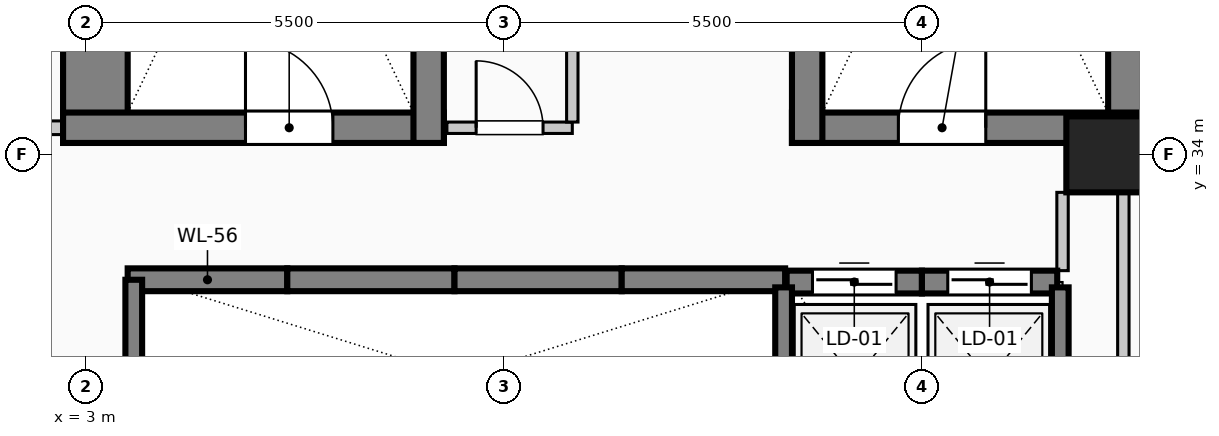
"""IFC4 building model, lengths in metres.
Left out: names, types, materials, properties, quantities, classifications, styles, units other than length and angle.
Written with IfcOpenShell. Run it as: python <this file> out.ifc"""

import sys

from ifc_helpers import new_model, si_unit, direction, frame, frame_2d, origin, origin_2d, place, context, subcontext, project, spatial, rectangle, circle, extrude, element, fill, save


model = new_model("IFC4")
c1 = context("Model", 3, precision=1e-05, world=origin(), true_north=direction((0.0, 1.0)))
c2 = subcontext(c1, "Body", "Model", "MODEL_VIEW")
j1 = project(units=[si_unit("LENGTHUNIT", "METRE"), si_unit("PLANEANGLEUNIT", "RADIAN")], contexts=[c1])
p1 = place(None, origin())
s1 = spatial("IfcSite", under=j1, at=p1, CompositionType="ELEMENT")
p2 = place(p1, origin())
s2 = spatial("IfcBuilding", under=s1, at=p2, CompositionType="ELEMENT")
p3 = place(p2, frame((0.0, 0.0, 108.6)))
s3 = spatial("IfcBuildingStorey", under=s2, at=p3, CompositionType="ELEMENT", Elevation=108.6)
for number, where, z_axis, x_axis in (
    (1, (3.125, 34.15, 0.0), (0.0, 0.0, 1.0), (0.0, 1.0, 0.0)),
    (2, (16.875, 34.15, 0.0), (0.0, 0.0, 1.0), (0.0, 1.0, 0.0)),
):
    element("IfcWall", number, at=place(p3, frame(where, z_axis=z_axis, x_axis=x_axis)), inside=s3, PredefinedType="SHEAR", context=c2, shape_type="SweptSolid", body=[
        extrude(rectangle(XDim=9.13, YDim=0.85, at=frame_2d((4.565, 0.0))), origin(), (0.0, 0.0, 1.0), 4.0),
    ])
p4 = place(p3, frame((2.7, 34.35, 0.0), z_axis=(0.0, 0.0, 1.0), x_axis=(1.0, 0.0, 0.0)))
e3 = element("IfcWall", 3, at=p4, inside=s3, PredefinedType="SHEAR", context=c2, shape_type="SweptSolid", body=[
    extrude(rectangle(XDim=5.01, YDim=0.4, at=frame_2d((2.505, 0.0))), origin(), (0.0, 0.0, 1.0), 4.0),
])
p5 = place(p4, frame((2.4, 0.0, 0.0)))
e4 = element("IfcOpeningElement", 4, at=p5, cuts=e3, PredefinedType="OPENING", context=c2, shape_type="SweptSolid", body=[
    extrude(rectangle(XDim=1.15, YDim=2.2, at=frame_2d((0.575, 1.1))), frame((0.0, 0.21, 0.0), z_axis=(0.0, -1.0, 0.0), x_axis=(1.0, 0.0, 0.0)), (0.0, 0.0, 1.0), 0.42),
])
p6 = place(p3, frame((12.29, 34.35, 0.0), z_axis=(0.0, 0.0, 1.0), x_axis=(1.0, 0.0, 0.0)))
e5 = element("IfcWall", 5, at=p6, inside=s3, PredefinedType="SHEAR", context=c2, shape_type="SweptSolid", body=[
    extrude(rectangle(XDim=5.01, YDim=0.4, at=frame_2d((2.505, 0.0))), origin(), (0.0, 0.0, 1.0), 4.0),
])
p7 = place(p6, frame((1.4, 0.0, 0.0)))
e6 = element("IfcOpeningElement", 6, at=p7, cuts=e5, PredefinedType="OPENING", context=c2, shape_type="SweptSolid", body=[
    extrude(rectangle(XDim=1.15, YDim=2.2, at=frame_2d((0.575, 1.1))), frame((0.0, 0.21, 0.0), z_axis=(0.0, -1.0, 0.0), x_axis=(1.0, 0.0, 0.0)), (0.0, 0.0, 1.0), 0.42),
])
for number, where, z_axis, x_axis in (
    (7, (7.51, 34.15, 0.0), (0.0, 0.0, 1.0), (0.0, 1.0, 0.0)),
    (8, (12.49, 34.15, 0.0), (0.0, 0.0, 1.0), (0.0, 1.0, 0.0)),
):
    element("IfcWall", number, at=place(p3, frame(where, z_axis=z_axis, x_axis=x_axis)), inside=s3, PredefinedType="SHEAR", context=c2, shape_type="SweptSolid", body=[
        extrude(rectangle(XDim=9.13, YDim=0.4, at=frame_2d((4.565, 0.0))), origin(), (0.0, 0.0, 1.0), 4.0),
    ])
p8 = place(p3, frame((16.4, 34.0, 0.0), z_axis=(0.0, 0.0, 1.0), x_axis=(1.0, 0.0, 0.0)))
e9 = element("IfcColumn", 9, at=p8, inside=s3, PredefinedType="COLUMN", context=c2, shape_type="SweptSolid", body=[
    extrude(circle(Radius=0.5, at=origin_2d()), origin(), (0.0, 0.0, 1.0), 4.0),
])
p9 = place(p3, frame((12.22, 32.32, 0.0), z_axis=(0.0, 0.0, 1.0), x_axis=(1.0, 0.0, 0.0)))
e10 = element("IfcWall", 10, at=p9, inside=s3, PredefinedType="SOLIDWALL", context=c2, shape_type="SweptSolid", body=[
    extrude(rectangle(XDim=1.78, YDim=0.3, at=frame_2d((0.89, 0.0))), origin(), (0.0, 0.0, 1.0), 4.0),
])
p10 = place(p9, frame((0.34, 0.0, 0.0)))
e11 = element("IfcOpeningElement", 11, at=p10, cuts=e10, PredefinedType="OPENING", context=c2, shape_type="SweptSolid", body=[
    extrude(rectangle(XDim=1.1, YDim=2.2, at=frame_2d((0.55, 1.1))), frame((0.0, 0.16, 0.0), z_axis=(0.0, -1.0, 0.0), x_axis=(1.0, 0.0, 0.0)), (0.0, 0.0, 1.0), 0.32),
])
p11 = place(p3, frame((14.0, 32.32, 0.0), z_axis=(0.0, 0.0, 1.0), x_axis=(1.0, 0.0, 0.0)))
e12 = element("IfcWall", 12, at=p11, inside=s3, PredefinedType="SOLIDWALL", context=c2, shape_type="SweptSolid", body=[
    extrude(rectangle(XDim=1.78, YDim=0.3, at=frame_2d((0.89, 0.0))), origin(), (0.0, 0.0, 1.0), 4.0),
])
p12 = place(p11, frame((0.34, 0.0, 0.0)))
e13 = element("IfcOpeningElement", 13, at=p12, cuts=e12, PredefinedType="OPENING", context=c2, shape_type="SweptSolid", body=[
    extrude(rectangle(XDim=1.1, YDim=2.2, at=frame_2d((0.55, 1.1))), frame((0.0, 0.16, 0.0), z_axis=(0.0, -1.0, 0.0), x_axis=(1.0, 0.0, 0.0)), (0.0, 0.0, 1.0), 0.32),
])
p13 = place(p3, frame((3.55, 32.35, 0.0), z_axis=(0.0, 0.0, 1.0), x_axis=(1.0, 0.0, 0.0)))
e14 = element("IfcWall", 14, at=p13, inside=s3, PredefinedType="SOLIDWALL", context=c2, shape_type="SweptSolid", body=[
    extrude(rectangle(XDim=2.1, YDim=0.3, at=frame_2d((1.05, 0.0))), origin(), (0.0, 0.0, 1.0), 4.0),
])
p14 = place(p3, frame((5.65, 32.35, 0.0), z_axis=(0.0, 0.0, 1.0), x_axis=(1.0, 0.0, 0.0)))
e15 = element("IfcWall", 15, at=p14, inside=s3, PredefinedType="SOLIDWALL", context=c2, shape_type="SweptSolid", body=[
    extrude(rectangle(XDim=2.2, YDim=0.3, at=frame_2d((1.1, 0.0))), origin(), (0.0, 0.0, 1.0), 4.0),
])
p15 = place(p3, frame((7.85, 32.35, 0.0), z_axis=(0.0, 0.0, 1.0), x_axis=(1.0, 0.0, 0.0)))
e16 = element("IfcWall", 16, at=p15, inside=s3, PredefinedType="SOLIDWALL", context=c2, shape_type="SweptSolid", body=[
    extrude(rectangle(XDim=2.2, YDim=0.3, at=frame_2d((1.1, 0.0))), origin(), (0.0, 0.0, 1.0), 4.0),
])
p16 = place(p3, frame((10.05, 32.35, 0.0), z_axis=(0.0, 0.0, 1.0), x_axis=(1.0, 0.0, 0.0)))
e17 = element("IfcWall", 17, at=p16, inside=s3, PredefinedType="SOLIDWALL", context=c2, shape_type="SweptSolid", body=[
    extrude(rectangle(XDim=2.15, YDim=0.3, at=frame_2d((1.075, 0.0))), origin(), (0.0, 0.0, 1.0), 4.0),
])
p17 = place(p3, frame((3.63, 26.8, 0.0), z_axis=(0.0, 0.0, 1.0), x_axis=(0.0, 1.0, 0.0)))
e18 = element("IfcWall", 18, at=p17, inside=s3, PredefinedType="SOLIDWALL", context=c2, shape_type="SweptSolid", body=[
    extrude(rectangle(XDim=5.55, YDim=0.22, at=frame_2d((2.775, 0.0))), origin(), (0.0, 0.0, 1.0), 4.0),
])
for number, where, z_axis, x_axis in (
    (19, (12.18, 26.8, 0.0), (0.0, 0.0, 1.0), (0.0, 1.0, 0.0)),
    (20, (15.82, 26.8, 0.0), (0.0, 0.0, 1.0), (0.0, 1.0, 0.0)),
):
    element("IfcWall", number, at=place(p3, frame(where, z_axis=z_axis, x_axis=x_axis)), inside=s3, PredefinedType="SOLIDWALL", context=c2, shape_type="SweptSolid", body=[
        extrude(rectangle(XDim=5.45, YDim=0.22, at=frame_2d((2.725, 0.0))), origin(), (0.0, 0.0, 1.0), 4.0),
    ])
p18 = place(p3, frame((1.175, 34.35, 0.0), z_axis=(0.0, 0.0, 1.0), x_axis=(1.0, 0.0, 0.0)))
e21 = element("IfcWall", 21, at=p18, inside=s3, PredefinedType="PARTITIONING", context=c2, shape_type="SweptSolid", body=[
    extrude(rectangle(XDim=1.525, YDim=0.18, at=frame_2d((0.762, 0.0))), origin(), (0.0, 0.0, 1.0), 3.725),
])
p19 = place(p3, frame((7.75, 34.35, 0.0), z_axis=(0.0, 0.0, 1.0), x_axis=(1.0, 0.0, 0.0)))
e22 = element("IfcWall", 22, at=p19, inside=s3, PredefinedType="PARTITIONING", context=c2, shape_type="SweptSolid", body=[
    extrude(rectangle(XDim=1.65, YDim=0.15, at=frame_2d((0.825, 0.0))), origin(), (0.0, 0.0, 1.0), 3.725),
])
p20 = place(p19, frame((0.385, 0.0, 0.0)))
e23 = element("IfcOpeningElement", 23, at=p20, cuts=e22, PredefinedType="OPENING", context=c2, shape_type="SweptSolid", body=[
    extrude(rectangle(XDim=0.88, YDim=2.1, at=frame_2d((0.44, 1.05))), frame((0.0, 0.085, 0.0), z_axis=(0.0, -1.0, 0.0), x_axis=(1.0, 0.0, 0.0)), (0.0, 0.0, 1.0), 0.17),
])
p21 = place(p3, frame((9.4, 34.425, 0.0), z_axis=(0.0, 0.0, 1.0), x_axis=(0.0, 1.0, 0.0)))
e24 = element("IfcWall", 24, at=p21, inside=s3, PredefinedType="PARTITIONING", context=c2, shape_type="SweptSolid", body=[
    extrude(rectangle(XDim=2.065, YDim=0.15, at=frame_2d((1.032, 0.0))), origin(), (0.0, 0.0, 1.0), 3.725),
])
p22 = place(p3, frame((15.85, 32.47, 0.0), z_axis=(0.0, 0.0, 1.0), x_axis=(0.0, 1.0, 0.0)))
e25 = element("IfcWall", 25, at=p22, inside=s3, PredefinedType="PARTITIONING", context=c2, shape_type="SweptSolid", body=[
    extrude(rectangle(XDim=1.03, YDim=0.15, at=frame_2d((0.515, 0.0))), origin(), (0.0, 0.0, 1.0), 3.725),
])
p23 = place(p3, frame((16.65, 23.475, 0.0), z_axis=(0.0, 0.0, 1.0), x_axis=(0.0, 1.0, 0.0)))
e26 = element("IfcWall", 26, at=p23, inside=s3, PredefinedType="PARTITIONING", context=c2, shape_type="SweptSolid", body=[
    extrude(rectangle(XDim=10.025, YDim=0.15, at=frame_2d((5.012, 0.0))), origin(), (0.0, 0.0, 1.0), 3.07),
])
p24 = place(p10, origin())
e27 = element("IfcDoor", 27, at=p24, inside=s3, OperationType="SLIDING_TO_LEFT", PredefinedType="DOOR", context=c2, shape_type="SweptSolid", body=[
    extrude(rectangle(XDim=1.1, YDim=2.2, at=frame_2d((0.55, 1.1))), frame((0.0, 0.025, 0.0), z_axis=(0.0, -1.0, 0.0), x_axis=(1.0, 0.0, 0.0)), (0.0, 0.0, 1.0), 0.05),
])
fill(e11, e27)
p25 = place(p12, origin())
e28 = element("IfcDoor", 28, at=p25, inside=s3, OperationType="SLIDING_TO_RIGHT", PredefinedType="DOOR", context=c2, shape_type="SweptSolid", body=[
    extrude(rectangle(XDim=1.1, YDim=2.2, at=frame_2d((0.55, 1.1))), frame((0.0, 0.025, 0.0), z_axis=(0.0, -1.0, 0.0), x_axis=(1.0, 0.0, 0.0)), (0.0, 0.0, 1.0), 0.05),
])
fill(e13, e28)
p26 = place(p5, origin())
e29 = element("IfcDoor", 29, at=p26, inside=s3, OperationType="SINGLE_SWING_LEFT", PredefinedType="DOOR", context=c2, shape_type="SweptSolid", body=[
    extrude(rectangle(XDim=1.15, YDim=2.2, at=frame_2d((0.575, 1.1))), frame((0.0, 0.025, 0.0), z_axis=(0.0, -1.0, 0.0), x_axis=(1.0, 0.0, 0.0)), (0.0, 0.0, 1.0), 0.05),
])
fill(e4, e29)
p27 = place(p7, origin())
e30 = element("IfcDoor", 30, at=p27, inside=s3, OperationType="SINGLE_SWING_RIGHT", PredefinedType="DOOR", context=c2, shape_type="SweptSolid", body=[
    extrude(rectangle(XDim=1.15, YDim=2.2, at=frame_2d((0.575, 1.1))), frame((0.0, 0.025, 0.0), z_axis=(0.0, -1.0, 0.0), x_axis=(1.0, 0.0, 0.0)), (0.0, 0.0, 1.0), 0.05),
])
fill(e6, e30)
p28 = place(p20, origin())
e31 = element("IfcDoor", 31, at=p28, inside=s3, OperationType="SINGLE_SWING_LEFT", PredefinedType="DOOR", context=c2, shape_type="SweptSolid", body=[
    extrude(rectangle(XDim=0.88, YDim=2.1, at=frame_2d((0.44, 1.05))), frame((0.0, 0.025, 0.0), z_axis=(0.0, -1.0, 0.0), x_axis=(1.0, 0.0, 0.0)), (0.0, 0.0, 1.0), 0.05),
])
fill(e23, e31)
save(model, sys.argv[1])
